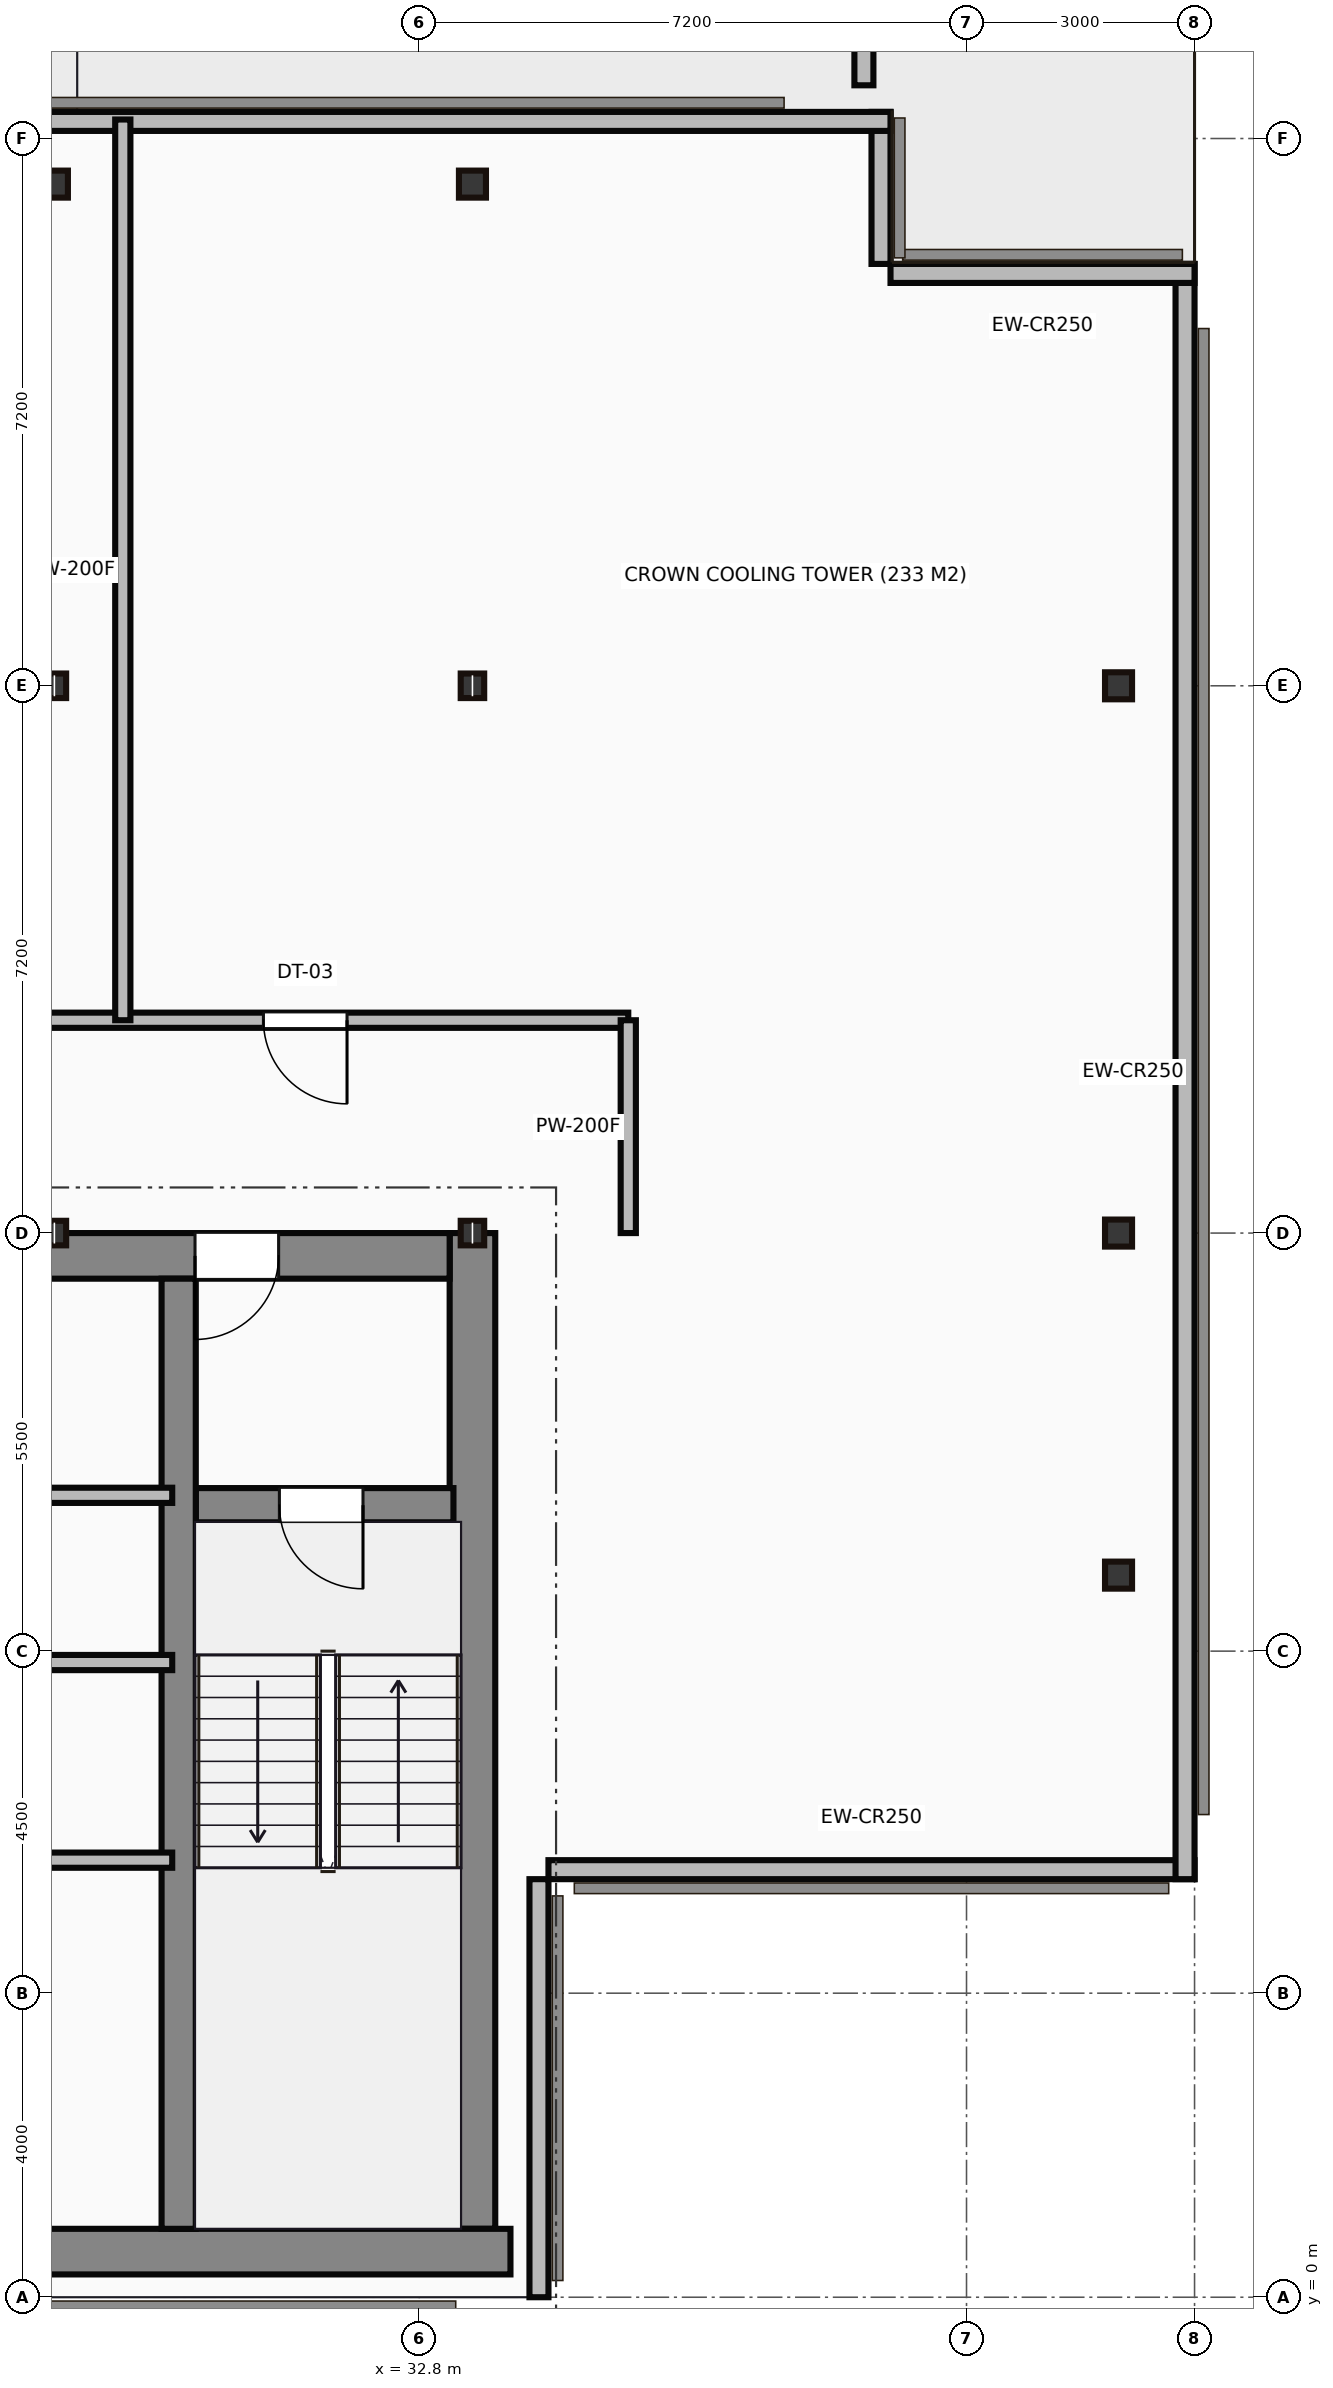
"""IFC4 building model, lengths in metres.
Left out: names, types, materials, properties, quantities, classifications, styles, units other than length and angle.
Written with IfcOpenShell. Run it as: python <this file> out.ifc"""

import sys

from ifc_helpers import new_model, si_unit, direction, frame, frame_2d, origin, origin_2d, place, context, subcontext, project, spatial, rectangle, hollow_rectangle, i_section, extrude, source, transform, mapped, element, fill, save


model = new_model("IFC4")
c1 = context("Model", 3, precision=1e-05, world=origin(), true_north=direction((0.0, 1.0)))
c2 = subcontext(c1, "Body", "Model", "MODEL_VIEW")
j1 = project(units=[si_unit("LENGTHUNIT", "METRE"), si_unit("PLANEANGLEUNIT", "RADIAN")], contexts=[c1])
p1 = place(None, origin())
s1 = spatial("IfcSite", under=j1, at=p1, CompositionType="ELEMENT")
p2 = place(p1, origin())
s2 = spatial("IfcBuilding", under=s1, at=p2, CompositionType="ELEMENT")
p3 = place(p2, frame((0.0, 0.0, 292.25)))
s3 = spatial("IfcBuildingStorey", under=s2, at=p3, CompositionType="ELEMENT", Elevation=292.25)
m1 = source(origin(), c2, "Body", "SweptSolid", [
    extrude(rectangle(XDim=29.5, YDim=0.6, at=frame_2d((14.75, 0.0))), origin(), (0.0, 0.0, 1.0), 3.8),
])
p4 = place(p3, frame((4.5, 0.6, 0.0), z_axis=(0.0, 0.0, 1.0), x_axis=(1.0, 0.0, 0.0)))
e1 = element("IfcWall", 1, at=p4, inside=s3, PredefinedType="SHEAR", context=c2, shape_type="MappedRepresentation", body=[
    mapped(m1, transform((0.0, 0.0, 0.0))),
])
m2 = source(origin(), c2, "Body", "SweptSolid", [
    extrude(rectangle(XDim=13.1, YDim=0.6, at=frame_2d((6.55, 0.0))), origin(), (0.0, 0.0, 1.0), 3.8),
])
p5 = place(p3, frame((33.5, 0.9, 0.0), z_axis=(0.0, 0.0, 1.0), x_axis=(0.0, 1.0, 0.0)))
e2 = element("IfcWall", 2, at=p5, inside=s3, PredefinedType="SHEAR", context=c2, shape_type="MappedRepresentation", body=[
    mapped(m2, transform((0.0, 0.0, 0.0))),
])
m3 = source(origin(), c2, "Body", "SweptSolid", [
    extrude(rectangle(XDim=12.6, YDim=0.6, at=frame_2d((6.3, 0.0))), origin(), (0.0, 0.0, 1.0), 3.8),
])
p6 = place(p3, frame((20.6, 13.7, 0.0), z_axis=(0.0, 0.0, 1.0), x_axis=(1.0, 0.0, 0.0)))
e3 = element("IfcWall", 3, at=p6, inside=s3, PredefinedType="SHEAR", context=c2, shape_type="MappedRepresentation", body=[
    mapped(m3, transform((0.0, 0.0, 0.0))),
])
p7 = place(p6, frame((9.25, 0.0, 0.0)))
e4 = element("IfcOpeningElement", 4, at=p7, cuts=e3, PredefinedType="OPENING", context=c2, shape_type="SweptSolid", body=[
    extrude(rectangle(XDim=1.1, YDim=2.15, at=frame_2d((0.55, 1.075))), frame((0.0, 0.31, 0.0), z_axis=(0.0, -1.0, 0.0), x_axis=(1.0, 0.0, 0.0)), (0.0, 0.0, 1.0), 0.62),
])
m4 = source(origin(), c2, "Body", "SweptSolid", [
    extrude(rectangle(XDim=12.5, YDim=0.45, at=frame_2d((6.25, 0.0))), origin(), (0.0, 0.0, 1.0), 3.8),
])
p8 = place(p3, frame((29.635, 0.9, 0.0), z_axis=(0.0, 0.0, 1.0), x_axis=(0.0, 1.0, 0.0)))
e5 = element("IfcWall", 5, at=p8, inside=s3, PredefinedType="SHEAR", context=c2, shape_type="MappedRepresentation", body=[
    mapped(m4, transform((0.0, 0.0, 0.0))),
])
m5 = source(origin(), c2, "Body", "SweptSolid", [
    extrude(rectangle(XDim=3.39, YDim=0.45, at=frame_2d((1.695, 0.0))), origin(), (0.0, 0.0, 1.0), 3.8),
])
p9 = place(p3, frame((29.86, 10.42, 0.0), z_axis=(0.0, 0.0, 1.0), x_axis=(1.0, 0.0, 0.0)))
e6 = element("IfcWall", 6, at=p9, inside=s3, PredefinedType="SHEAR", context=c2, shape_type="MappedRepresentation", body=[
    mapped(m5, transform((0.0, 0.0, 0.0))),
])
p10 = place(p9, frame((1.1, 0.0, 0.0)))
e7 = element("IfcOpeningElement", 7, at=p10, cuts=e6, PredefinedType="OPENING", context=c2, shape_type="SweptSolid", body=[
    extrude(rectangle(XDim=1.1, YDim=2.15, at=frame_2d((0.55, 1.075))), frame((0.0, 0.235, 0.0), z_axis=(0.0, -1.0, 0.0), x_axis=(1.0, 0.0, 0.0)), (0.0, 0.0, 1.0), 0.47),
])
m6 = source(origin(), c2, "Body", "SweptSolid", [
    extrude(i_section(OverallWidth=0.309, OverallDepth=0.323, WebThickness=0.014, FlangeThickness=0.023, at=origin_2d()), origin(), (0.0, 0.0, 1.0), 3.8),
])
for number, where, z_axis, x_axis in (
    (8, (28.0, 14.0, 0.0), (0.0, 0.0, 1.0), (1.0, 0.0, 0.0)),
    (9, (28.0, 21.2, 0.0), (0.0, 0.0, 1.0), (1.0, 0.0, 0.0)),
):
    element("IfcColumn", number, at=place(p3, frame(where, z_axis=z_axis, x_axis=x_axis)), inside=s3, PredefinedType="COLUMN", context=c2, shape_type="MappedRepresentation", body=[
        mapped(m6, transform((0.0, 0.0, 0.0))),
    ])
m7 = source(origin(), c2, "Body", "SweptSolid", [
    extrude(hollow_rectangle(XDim=0.356, YDim=0.356, WallThickness=0.019, at=origin_2d()), origin(), (0.0, 0.0, 1.0), 3.8),
])
p11 = place(p3, frame((28.0, 27.8, 0.0), z_axis=(0.0, 0.0, 1.0), x_axis=(1.0, 0.0, 0.0)))
e10 = element("IfcColumn", 10, at=p11, inside=s3, PredefinedType="COLUMN", context=c2, shape_type="MappedRepresentation", body=[
    mapped(m7, transform((0.0, 0.0, 0.0))),
])
for number, where, z_axis, x_axis in (
    (11, (33.5, 14.0, 0.0), (0.0, 0.0, 1.0), (1.0, 0.0, 0.0)),
    (12, (33.5, 21.2, 0.0), (0.0, 0.0, 1.0), (1.0, 0.0, 0.0)),
):
    element("IfcColumn", number, at=place(p3, frame(where, z_axis=z_axis, x_axis=x_axis)), inside=s3, PredefinedType="COLUMN", context=c2, shape_type="MappedRepresentation", body=[
        mapped(m6, transform((0.0, 0.0, 0.0))),
    ])
for number, where, z_axis, x_axis in (
    (13, (33.5, 27.8, 0.0), (0.0, 0.0, 1.0), (1.0, 0.0, 0.0)),
    (14, (42.0, 9.5, 0.0), (0.0, 0.0, 1.0), (1.0, 0.0, 0.0)),
    (15, (42.0, 14.0, 0.0), (0.0, 0.0, 1.0), (1.0, 0.0, 0.0)),
    (16, (42.0, 21.2, 0.0), (0.0, 0.0, 1.0), (1.0, 0.0, 0.0)),
):
    element("IfcColumn", number, at=place(p3, frame(where, z_axis=z_axis, x_axis=x_axis)), inside=s3, PredefinedType="COLUMN", context=c2, shape_type="MappedRepresentation", body=[
        mapped(m7, transform((0.0, 0.0, 0.0))),
    ])
m8 = source(origin(), c2, "Body", "SweptSolid", [
    extrude(rectangle(XDim=5.5, YDim=0.25, at=frame_2d((2.75, 0.0))), origin(), (0.0, 0.0, 1.0), 3.5),
])
p12 = place(p3, frame((34.375, 0.0, 0.0), z_axis=(0.0, 0.0, 1.0), x_axis=(0.0, 1.0, 0.0)))
e17 = element("IfcWall", 17, at=p12, inside=s3, PredefinedType="STANDARD", context=c2, shape_type="MappedRepresentation", body=[
    mapped(m8, transform((0.0, 0.0, 0.0))),
])
m9 = source(origin(), c2, "Body", "SweptSolid", [
    extrude(rectangle(XDim=8.5, YDim=0.25, at=frame_2d((4.25, 0.0))), origin(), (0.0, 0.0, 1.0), 3.5),
])
p13 = place(p3, frame((34.5, 5.625, 0.0), z_axis=(0.0, 0.0, 1.0), x_axis=(1.0, 0.0, 0.0)))
e18 = element("IfcWall", 18, at=p13, inside=s3, PredefinedType="STANDARD", context=c2, shape_type="MappedRepresentation", body=[
    mapped(m9, transform((0.0, 0.0, 0.0))),
])
m10 = source(origin(), c2, "Body", "SweptSolid", [
    extrude(rectangle(XDim=21.25, YDim=0.25, at=frame_2d((10.625, 0.0))), origin(), (0.0, 0.0, 1.0), 3.5),
])
p14 = place(p3, frame((42.875, 5.5, 0.0), z_axis=(0.0, 0.0, 1.0), x_axis=(0.0, 1.0, 0.0)))
e19 = element("IfcWall", 19, at=p14, inside=s3, PredefinedType="STANDARD", context=c2, shape_type="MappedRepresentation", body=[
    mapped(m10, transform((0.0, 0.0, 0.0))),
])
m11 = source(origin(), c2, "Body", "SweptSolid", [
    extrude(rectangle(XDim=4.0, YDim=0.25, at=frame_2d((2.0, 0.0))), origin(), (0.0, 0.0, 1.0), 3.5),
])
p15 = place(p3, frame((43.0, 26.625, 0.0), z_axis=(0.0, 0.0, 1.0), x_axis=(-1.0, 0.0, 0.0)))
e20 = element("IfcWall", 20, at=p15, inside=s3, PredefinedType="STANDARD", context=c2, shape_type="MappedRepresentation", body=[
    mapped(m11, transform((0.0, 0.0, 0.0))),
])
m12 = source(origin(), c2, "Body", "SweptSolid", [
    extrude(rectangle(XDim=2.0, YDim=0.25, at=frame_2d((1.0, 0.0))), origin(), (0.0, 0.0, 1.0), 3.5),
])
p16 = place(p3, frame((38.875, 26.75, 0.0), z_axis=(0.0, 0.0, 1.0), x_axis=(0.0, 1.0, 0.0)))
e21 = element("IfcWall", 21, at=p16, inside=s3, PredefinedType="STANDARD", context=c2, shape_type="MappedRepresentation", body=[
    mapped(m12, transform((0.0, 0.0, 0.0))),
])
m13 = source(origin(), c2, "Body", "SweptSolid", [
    extrude(rectangle(XDim=35.0, YDim=0.25, at=frame_2d((17.5, 0.0))), origin(), (0.0, 0.0, 1.0), 3.5),
])
p17 = place(p3, frame((39.0, 28.625, 0.0), z_axis=(0.0, 0.0, 1.0), x_axis=(-1.0, 0.0, 0.0)))
e22 = element("IfcWall", 22, at=p17, inside=s3, PredefinedType="STANDARD", context=c2, shape_type="MappedRepresentation", body=[
    mapped(m13, transform((0.0, 0.0, 0.0))),
])
p18 = place(p17, frame((13.5, 0.0, 0.0)))
e23 = element("IfcOpeningElement", 23, at=p18, cuts=e22, PredefinedType="OPENING", context=c2, shape_type="SweptSolid", body=[
    extrude(rectangle(XDim=1.8, YDim=2.2, at=frame_2d((0.9, 1.1))), frame((0.0, 0.135, 0.0), z_axis=(0.0, -1.0, 0.0), x_axis=(1.0, 0.0, 0.0)), (0.0, 0.0, 1.0), 0.27),
])
p19 = place(p17, frame((20.3, 0.0, 0.0)))
e24 = element("IfcOpeningElement", 24, at=p19, cuts=e22, PredefinedType="OPENING", context=c2, shape_type="SweptSolid", body=[
    extrude(rectangle(XDim=1.8, YDim=2.2, at=frame_2d((0.9, 1.1))), frame((0.0, 0.135, 0.0), z_axis=(0.0, -1.0, 0.0), x_axis=(1.0, 0.0, 0.0)), (0.0, 0.0, 1.0), 0.27),
])
m14 = source(origin(), c2, "Body", "SweptSolid", [
    extrude(rectangle(XDim=5.7, YDim=0.25, at=frame_2d((2.85, 0.0))), origin(), (0.0, 0.0, 1.0), 1.15),
])
p20 = place(p3, frame((38.65, 29.1, 0.0), z_axis=(0.0, 0.0, 1.0), x_axis=(0.0, 1.0, 0.0)))
e25 = element("IfcWall", 25, at=p20, inside=s3, PredefinedType="PARAPET", context=c2, shape_type="MappedRepresentation", body=[
    mapped(m14, transform((0.0, 0.0, 0.0))),
])
m15 = source(origin(), c2, "Body", "SweptSolid", [
    extrude(rectangle(XDim=8.8, YDim=0.2, at=frame_2d((4.4, 0.0))), origin(), (0.0, 0.0, 1.0), 3.5),
])
p21 = place(p3, frame((20.75, 10.55, 0.0), z_axis=(0.0, 0.0, 1.0), x_axis=(1.0, 0.0, 0.0)))
e26 = element("IfcWall", 26, at=p21, inside=s3, PredefinedType="PARTITIONING", context=c2, shape_type="MappedRepresentation", body=[
    mapped(m15, transform((0.0, 0.0, 0.0))),
])
m16 = source(origin(), c2, "Body", "SweptSolid", [
    extrude(rectangle(XDim=4.55, YDim=0.2, at=frame_2d((2.275, 0.0))), origin(), (0.0, 0.0, 1.0), 3.5),
])
for number, where, z_axis, x_axis in (
    (27, (25.0, 8.35, 0.0), (0.0, 0.0, 1.0), (1.0, 0.0, 0.0)),
    (28, (25.0, 5.75, 0.0), (0.0, 0.0, 1.0), (1.0, 0.0, 0.0)),
):
    element("IfcWall", number, at=place(p3, frame(where, z_axis=z_axis, x_axis=x_axis)), inside=s3, PredefinedType="PARTITIONING", context=c2, shape_type="MappedRepresentation", body=[
        mapped(m16, transform((0.0, 0.0, 0.0))),
    ])
m17 = source(origin(), c2, "Body", "SweptSolid", [
    extrude(rectangle(XDim=21.6, YDim=0.2, at=frame_2d((10.8, 0.0))), origin(), (0.0, 0.0, 1.0), 3.5),
])
p22 = place(p3, frame((13.95, 16.8, 0.0), z_axis=(0.0, 0.0, 1.0), x_axis=(1.0, 0.0, 0.0)))
e29 = element("IfcWall", 29, at=p22, inside=s3, PredefinedType="PARTITIONING", context=c2, shape_type="MappedRepresentation", body=[
    mapped(m17, transform((0.0, 0.0, 0.0))),
])
p23 = place(p22, frame((4.2, 0.0, 0.0)))
e30 = element("IfcOpeningElement", 30, at=p23, cuts=e29, PredefinedType="OPENING", context=c2, shape_type="SweptSolid", body=[
    extrude(rectangle(XDim=1.1, YDim=2.15, at=frame_2d((0.55, 1.075))), frame((0.0, 0.11, 0.0), z_axis=(0.0, -1.0, 0.0), x_axis=(1.0, 0.0, 0.0)), (0.0, 0.0, 1.0), 0.22),
])
p24 = place(p22, frame((16.8, 0.0, 0.0)))
e31 = element("IfcOpeningElement", 31, at=p24, cuts=e29, PredefinedType="OPENING", context=c2, shape_type="SweptSolid", body=[
    extrude(rectangle(XDim=1.1, YDim=2.15, at=frame_2d((0.55, 1.075))), frame((0.0, 0.11, 0.0), z_axis=(0.0, -1.0, 0.0), x_axis=(1.0, 0.0, 0.0)), (0.0, 0.0, 1.0), 0.22),
])
m18 = source(origin(), c2, "Body", "SweptSolid", [
    extrude(rectangle(XDim=2.8, YDim=0.2, at=frame_2d((1.4, 0.0))), origin(), (0.0, 0.0, 1.0), 3.5),
])
p25 = place(p3, frame((35.55, 14.0, 0.0), z_axis=(0.0, 0.0, 1.0), x_axis=(0.0, 1.0, 0.0)))
e32 = element("IfcWall", 32, at=p25, inside=s3, PredefinedType="PARTITIONING", context=c2, shape_type="MappedRepresentation", body=[
    mapped(m18, transform((0.0, 0.0, 0.0))),
])
m19 = source(origin(), c2, "Body", "SweptSolid", [
    extrude(rectangle(XDim=11.85, YDim=0.2, at=frame_2d((5.925, 0.0))), origin(), (0.0, 0.0, 1.0), 3.5),
])
p26 = place(p3, frame((28.9, 16.8, 0.0), z_axis=(0.0, 0.0, 1.0), x_axis=(0.0, 1.0, 0.0)))
e33 = element("IfcWall", 33, at=p26, inside=s3, PredefinedType="PARTITIONING", context=c2, shape_type="MappedRepresentation", body=[
    mapped(m19, transform((0.0, 0.0, 0.0))),
])
m20 = source(origin(), c2, "Body", "SweptSolid", [
    extrude(rectangle(XDim=1.1, YDim=2.15, at=frame_2d((0.55, 1.075))), frame((0.0, 0.025, 0.0), z_axis=(0.0, -1.0, 0.0), x_axis=(1.0, 0.0, 0.0)), (0.0, 0.0, 1.0), 0.05),
])
p27 = place(p10, frame((1.1, 0.0, 0.0), z_axis=(0.0, 0.0, 1.0), x_axis=(-1.0, 0.0, 0.0)))
e34 = element("IfcDoor", 34, at=p27, inside=s3, OperationType="SINGLE_SWING_RIGHT", PredefinedType="DOOR", context=c2, shape_type="MappedRepresentation", body=[
    mapped(m20, transform((0.0, 0.0, 0.0))),
])
fill(e7, e34)
p28 = place(p7, origin())
e35 = element("IfcDoor", 35, at=p28, inside=s3, OperationType="SINGLE_SWING_LEFT", PredefinedType="DOOR", context=c2, shape_type="MappedRepresentation", body=[
    mapped(m20, transform((0.0, 0.0, 0.0))),
])
fill(e4, e35)
p29 = place(p24, origin())
e36 = element("IfcDoor", 36, at=p29, inside=s3, OperationType="SINGLE_SWING_RIGHT", PredefinedType="DOOR", context=c2, shape_type="MappedRepresentation", body=[
    mapped(m20, transform((0.0, 0.0, 0.0))),
])
fill(e31, e36)
save(model, sys.argv[1])
